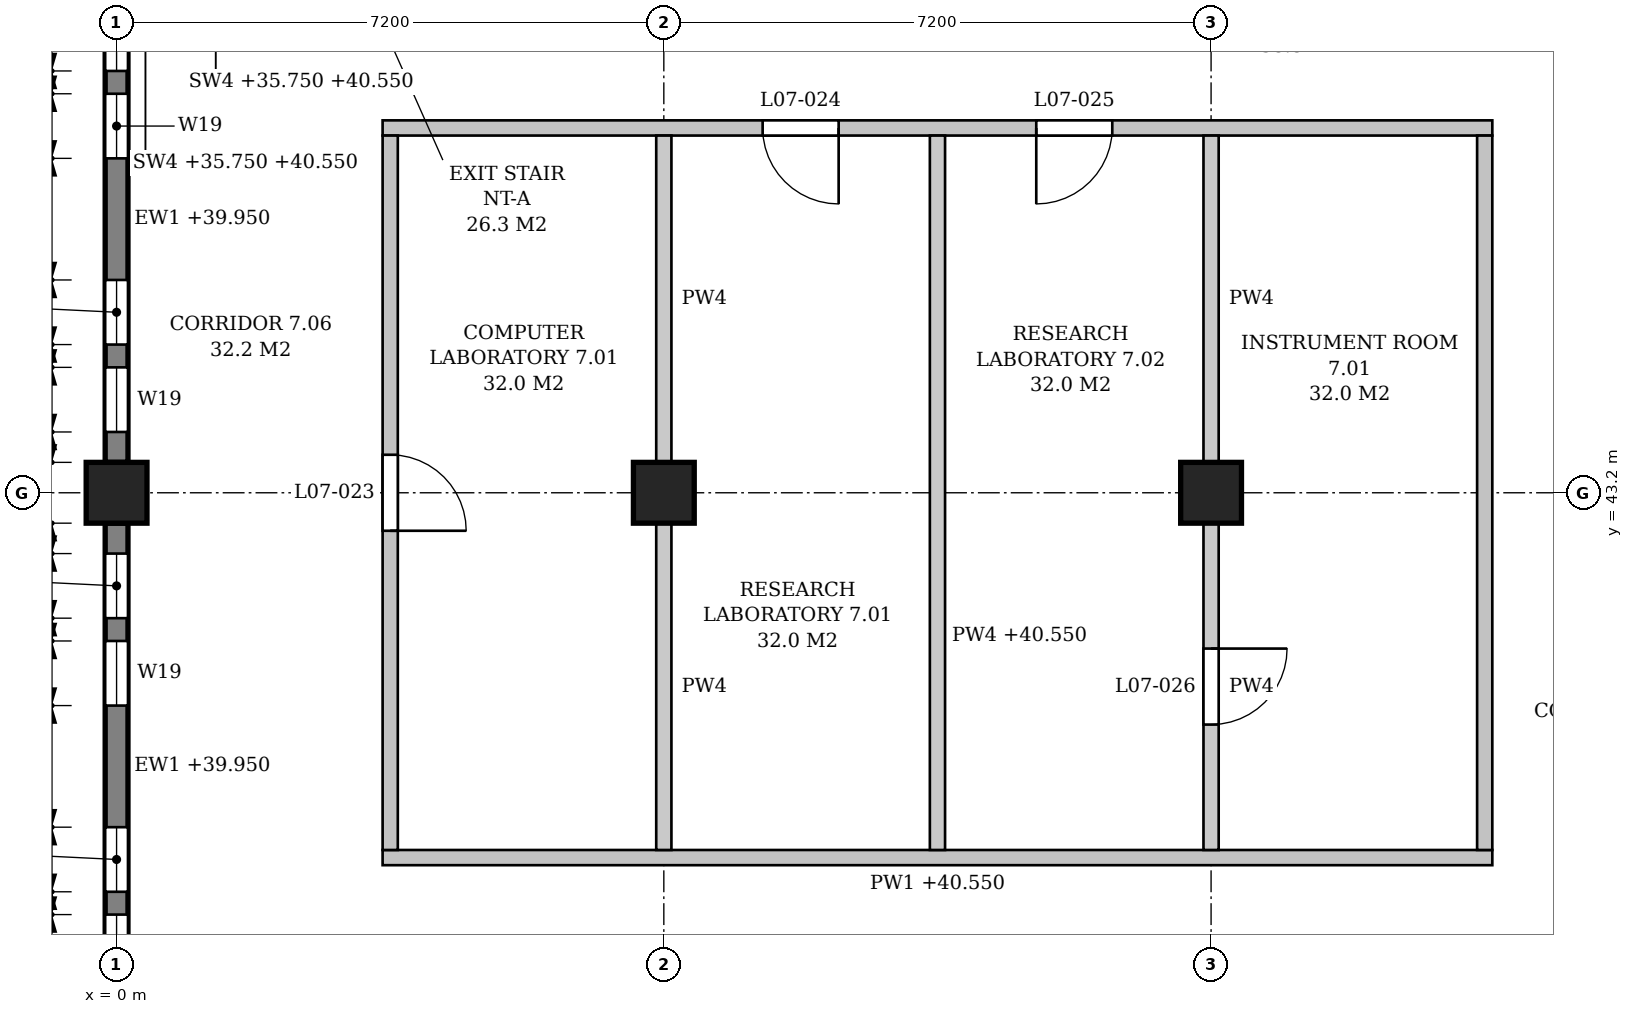
"""IFC4 building model, lengths in metres.
Left out: names, types, materials, properties, quantities, classifications, styles, units other than length and angle.
Written with IfcOpenShell. Run it as: python <this file> out.ifc"""

import sys

from ifc_helpers import new_model, si_unit, direction, frame, frame_2d, origin, origin_2d, place, context, subcontext, project, spatial, polyline, rectangle, outline, extrude, element, fill, save


model = new_model("IFC4")
c1 = context("Model", 3, precision=1e-05, world=origin(), true_north=direction((0.0, 1.0)))
c2 = subcontext(c1, "Body", "Model", "MODEL_VIEW")
j1 = project(units=[si_unit("LENGTHUNIT", "METRE"), si_unit("PLANEANGLEUNIT", "RADIAN")], contexts=[c1])
p1 = place(None, origin())
s1 = spatial("IfcSite", under=j1, at=p1, CompositionType="ELEMENT")
p2 = place(p1, origin())
s2 = spatial("IfcBuilding", under=s1, at=p2, CompositionType="ELEMENT")
p3 = place(p2, frame((0.0, 0.0, 36.0)))
s3 = spatial("IfcBuildingStorey", under=s2, at=p3, CompositionType="ELEMENT", Elevation=36.0)
for number, where, z_axis, x_axis in (
    (1, (0.0, 43.2, 0.0), (0.0, 0.0, 1.0), (1.0, 0.0, 0.0)),
    (2, (7.2, 43.2, 0.0), (0.0, 0.0, 1.0), (1.0, 0.0, 0.0)),
    (3, (14.4, 43.2, 0.0), (0.0, 0.0, 1.0), (1.0, 0.0, 0.0)),
):
    element("IfcColumn", number, at=place(p3, frame(where, z_axis=z_axis, x_axis=x_axis)), inside=s3, PredefinedType="COLUMN", context=c2, shape_type="SweptSolid", body=[
        extrude(rectangle(XDim=0.8, YDim=0.8, at=origin_2d()), origin(), (0.0, 0.0, 1.0), 4.8),
    ])
p4 = place(p3, frame((0.0, 36.4, 0.0), z_axis=(0.0, 0.0, 1.0), x_axis=(0.0, 1.0, 0.0)))
e4 = element("IfcWall", 4, at=p4, inside=s3, PredefinedType="STANDARD", context=c2, shape_type="SweptSolid", body=[
    extrude(rectangle(XDim=6.4, YDim=0.3, at=frame_2d((3.2, 0.0))), origin(), (0.0, 0.0, 1.0), 3.95),
])
p5 = place(p4, frame((0.4, 0.0, 0.9)))
e5 = element("IfcOpeningElement", 5, at=p5, cuts=e4, PredefinedType="OPENING", context=c2, shape_type="SweptSolid", body=[
    extrude(outline(polyline([(0.0, 0.0), (0.85, 0.0), (0.85, 2.55), (0.425, 3.0), (0.0, 2.55), (0.0, 0.0)])), frame((0.0, 0.16, 0.0), z_axis=(0.0, -1.0, 0.0), x_axis=(1.0, 0.0, 0.0)), (0.0, 0.0, 1.0), 0.32),
])
p6 = place(p4, frame((1.55, 0.0, 0.9)))
e6 = element("IfcOpeningElement", 6, at=p6, cuts=e4, PredefinedType="OPENING", context=c2, shape_type="SweptSolid", body=[
    extrude(outline(polyline([(0.0, 0.0), (0.85, 0.0), (0.85, 2.55), (0.425, 3.0), (0.0, 2.55), (0.0, 0.0)])), frame((0.0, 0.16, 0.0), z_axis=(0.0, -1.0, 0.0), x_axis=(1.0, 0.0, 0.0)), (0.0, 0.0, 1.0), 0.32),
])
p7 = place(p4, frame((4.0, 0.0, 0.9)))
e7 = element("IfcOpeningElement", 7, at=p7, cuts=e4, PredefinedType="OPENING", context=c2, shape_type="SweptSolid", body=[
    extrude(outline(polyline([(0.0, 0.0), (0.85, 0.0), (0.85, 2.55), (0.425, 3.0), (0.0, 2.55), (0.0, 0.0)])), frame((0.0, 0.16, 0.0), z_axis=(0.0, -1.0, 0.0), x_axis=(1.0, 0.0, 0.0)), (0.0, 0.0, 1.0), 0.32),
])
p8 = place(p4, frame((5.15, 0.0, 0.9)))
e8 = element("IfcOpeningElement", 8, at=p8, cuts=e4, PredefinedType="OPENING", context=c2, shape_type="SweptSolid", body=[
    extrude(outline(polyline([(0.0, 0.0), (0.85, 0.0), (0.85, 2.55), (0.425, 3.0), (0.0, 2.55), (0.0, 0.0)])), frame((0.0, 0.16, 0.0), z_axis=(0.0, -1.0, 0.0), x_axis=(1.0, 0.0, 0.0)), (0.0, 0.0, 1.0), 0.32),
])
p9 = place(p3, frame((0.0, 43.6, 0.0), z_axis=(0.0, 0.0, 1.0), x_axis=(0.0, 1.0, 0.0)))
e9 = element("IfcWall", 9, at=p9, inside=s3, PredefinedType="STANDARD", context=c2, shape_type="SweptSolid", body=[
    extrude(rectangle(XDim=6.4, YDim=0.3, at=frame_2d((3.2, 0.0))), origin(), (0.0, 0.0, 1.0), 3.95),
])
p10 = place(p9, frame((0.4, 0.0, 0.9)))
e10 = element("IfcOpeningElement", 10, at=p10, cuts=e9, PredefinedType="OPENING", context=c2, shape_type="SweptSolid", body=[
    extrude(outline(polyline([(0.0, 0.0), (0.85, 0.0), (0.85, 2.55), (0.425, 3.0), (0.0, 2.55), (0.0, 0.0)])), frame((0.0, 0.16, 0.0), z_axis=(0.0, -1.0, 0.0), x_axis=(1.0, 0.0, 0.0)), (0.0, 0.0, 1.0), 0.32),
])
p11 = place(p9, frame((1.55, 0.0, 0.9)))
e11 = element("IfcOpeningElement", 11, at=p11, cuts=e9, PredefinedType="OPENING", context=c2, shape_type="SweptSolid", body=[
    extrude(outline(polyline([(0.0, 0.0), (0.85, 0.0), (0.85, 2.55), (0.425, 3.0), (0.0, 2.55), (0.0, 0.0)])), frame((0.0, 0.16, 0.0), z_axis=(0.0, -1.0, 0.0), x_axis=(1.0, 0.0, 0.0)), (0.0, 0.0, 1.0), 0.32),
])
p12 = place(p9, frame((4.0, 0.0, 0.9)))
e12 = element("IfcOpeningElement", 12, at=p12, cuts=e9, PredefinedType="OPENING", context=c2, shape_type="SweptSolid", body=[
    extrude(outline(polyline([(0.0, 0.0), (0.85, 0.0), (0.85, 2.55), (0.425, 3.0), (0.0, 2.55), (0.0, 0.0)])), frame((0.0, 0.16, 0.0), z_axis=(0.0, -1.0, 0.0), x_axis=(1.0, 0.0, 0.0)), (0.0, 0.0, 1.0), 0.32),
])
p13 = place(p9, frame((5.15, 0.0, 0.9)))
e13 = element("IfcOpeningElement", 13, at=p13, cuts=e9, PredefinedType="OPENING", context=c2, shape_type="SweptSolid", body=[
    extrude(outline(polyline([(0.0, 0.0), (0.85, 0.0), (0.85, 2.55), (0.425, 3.0), (0.0, 2.55), (0.0, 0.0)])), frame((0.0, 0.16, 0.0), z_axis=(0.0, -1.0, 0.0), x_axis=(1.0, 0.0, 0.0)), (0.0, 0.0, 1.0), 0.32),
])
p14 = place(p3, frame((3.5, 38.4, 0.0), z_axis=(0.0, 0.0, 1.0), x_axis=(1.0, 0.0, 0.0)))
e14 = element("IfcWall", 14, at=p14, inside=s3, PredefinedType="PARTITIONING", context=c2, shape_type="SweptSolid", body=[
    extrude(outline(polyline([(0.0, 0.0), (14.6, 0.0), (14.6, 4.55), (11.125, 4.55), (11.125, 3.85), (10.675, 3.85), (10.675, 4.55), (3.925, 4.55), (3.925, 3.85), (3.475, 3.85), (3.475, 4.55), (0.0, 4.55), (0.0, 0.0)])), frame((0.0, 0.1, 0.0), z_axis=(0.0, -1.0, 0.0), x_axis=(1.0, 0.0, 0.0)), (0.0, 0.0, 1.0), 0.2),
])
p15 = place(p3, frame((3.5, 48.0, 0.0), z_axis=(0.0, 0.0, 1.0), x_axis=(1.0, 0.0, 0.0)))
e15 = element("IfcWall", 15, at=p15, inside=s3, PredefinedType="PARTITIONING", context=c2, shape_type="SweptSolid", body=[
    extrude(outline(polyline([(0.0, 0.0), (14.6, 0.0), (14.6, 4.55), (11.125, 4.55), (11.125, 3.85), (10.675, 3.85), (10.675, 4.55), (3.925, 4.55), (3.925, 3.85), (3.475, 3.85), (3.475, 4.55), (0.0, 4.55), (0.0, 0.0)])), frame((0.0, 0.1, 0.0), z_axis=(0.0, -1.0, 0.0), x_axis=(1.0, 0.0, 0.0)), (0.0, 0.0, 1.0), 0.2),
])
p16 = place(p15, frame((5.0, 0.0, 0.0)))
e16 = element("IfcOpeningElement", 16, at=p16, cuts=e15, PredefinedType="OPENING", context=c2, shape_type="SweptSolid", body=[
    extrude(rectangle(XDim=1.0, YDim=2.1, at=frame_2d((0.5, 1.05))), frame((0.0, 0.11, 0.0), z_axis=(0.0, -1.0, 0.0), x_axis=(1.0, 0.0, 0.0)), (0.0, 0.0, 1.0), 0.22),
])
p17 = place(p15, frame((8.6, 0.0, 0.0)))
e17 = element("IfcOpeningElement", 17, at=p17, cuts=e15, PredefinedType="OPENING", context=c2, shape_type="SweptSolid", body=[
    extrude(rectangle(XDim=1.0, YDim=2.1, at=frame_2d((0.5, 1.05))), frame((0.0, 0.11, 0.0), z_axis=(0.0, -1.0, 0.0), x_axis=(1.0, 0.0, 0.0)), (0.0, 0.0, 1.0), 0.22),
])
p18 = place(p3, frame((3.6, 38.5, 0.0), z_axis=(0.0, 0.0, 1.0), x_axis=(0.0, 1.0, 0.0)))
e18 = element("IfcWall", 18, at=p18, inside=s3, PredefinedType="PARTITIONING", context=c2, shape_type="SweptSolid", body=[
    extrude(outline(polyline([(0.0, 0.0), (9.4, 0.0), (9.4, 4.55), (4.925, 4.55), (4.925, 3.85), (4.475, 3.85), (4.475, 4.55), (0.0, 4.55), (0.0, 0.0)])), frame((0.0, 0.1, 0.0), z_axis=(0.0, -1.0, 0.0), x_axis=(1.0, 0.0, 0.0)), (0.0, 0.0, 1.0), 0.2),
])
p19 = place(p18, frame((4.2, 0.0, 0.0)))
e19 = element("IfcOpeningElement", 19, at=p19, cuts=e18, PredefinedType="OPENING", context=c2, shape_type="SweptSolid", body=[
    extrude(rectangle(XDim=1.0, YDim=2.1, at=frame_2d((0.5, 1.05))), frame((0.0, 0.11, 0.0), z_axis=(0.0, -1.0, 0.0), x_axis=(1.0, 0.0, 0.0)), (0.0, 0.0, 1.0), 0.22),
])
p20 = place(p3, frame((7.2, 38.5, 0.0), z_axis=(0.0, 0.0, 1.0), x_axis=(0.0, 1.0, 0.0)))
e20 = element("IfcWall", 20, at=p20, inside=s3, PredefinedType="PARTITIONING", context=c2, shape_type="SweptSolid", body=[
    extrude(rectangle(XDim=4.3, YDim=0.2, at=frame_2d((2.15, 0.0))), origin(), (0.0, 0.0, 1.0), 3.85),
])
p21 = place(p3, frame((7.2, 43.6, 0.0), z_axis=(0.0, 0.0, 1.0), x_axis=(0.0, 1.0, 0.0)))
e21 = element("IfcWall", 21, at=p21, inside=s3, PredefinedType="PARTITIONING", context=c2, shape_type="SweptSolid", body=[
    extrude(rectangle(XDim=4.3, YDim=0.2, at=frame_2d((2.15, 0.0))), origin(), (0.0, 0.0, 1.0), 3.85),
])
p22 = place(p3, frame((10.8, 38.5, 0.0), z_axis=(0.0, 0.0, 1.0), x_axis=(0.0, 1.0, 0.0)))
e22 = element("IfcWall", 22, at=p22, inside=s3, PredefinedType="PARTITIONING", context=c2, shape_type="SweptSolid", body=[
    extrude(outline(polyline([(0.0, 0.0), (9.4, 0.0), (9.4, 4.55), (4.925, 4.55), (4.925, 3.85), (4.475, 3.85), (4.475, 4.55), (0.0, 4.55), (0.0, 0.0)])), frame((0.0, 0.1, 0.0), z_axis=(0.0, -1.0, 0.0), x_axis=(1.0, 0.0, 0.0)), (0.0, 0.0, 1.0), 0.2),
])
p23 = place(p3, frame((14.4, 38.5, 0.0), z_axis=(0.0, 0.0, 1.0), x_axis=(0.0, 1.0, 0.0)))
e23 = element("IfcWall", 23, at=p23, inside=s3, PredefinedType="PARTITIONING", context=c2, shape_type="SweptSolid", body=[
    extrude(rectangle(XDim=4.3, YDim=0.2, at=frame_2d((2.15, 0.0))), origin(), (0.0, 0.0, 1.0), 3.85),
])
p24 = place(p23, frame((1.65, 0.0, 0.0)))
e24 = element("IfcOpeningElement", 24, at=p24, cuts=e23, PredefinedType="OPENING", context=c2, shape_type="SweptSolid", body=[
    extrude(rectangle(XDim=1.0, YDim=2.1, at=frame_2d((0.5, 1.05))), frame((0.0, 0.11, 0.0), z_axis=(0.0, -1.0, 0.0), x_axis=(1.0, 0.0, 0.0)), (0.0, 0.0, 1.0), 0.22),
])
p25 = place(p3, frame((14.4, 43.6, 0.0), z_axis=(0.0, 0.0, 1.0), x_axis=(0.0, 1.0, 0.0)))
e25 = element("IfcWall", 25, at=p25, inside=s3, PredefinedType="PARTITIONING", context=c2, shape_type="SweptSolid", body=[
    extrude(rectangle(XDim=4.3, YDim=0.2, at=frame_2d((2.15, 0.0))), origin(), (0.0, 0.0, 1.0), 3.85),
])
p26 = place(p3, frame((18.0, 38.5, 0.0), z_axis=(0.0, 0.0, 1.0), x_axis=(0.0, 1.0, 0.0)))
e26 = element("IfcWall", 26, at=p26, inside=s3, PredefinedType="PARTITIONING", context=c2, shape_type="SweptSolid", body=[
    extrude(outline(polyline([(0.0, 0.0), (9.4, 0.0), (9.4, 4.55), (4.925, 4.55), (4.925, 3.85), (4.475, 3.85), (4.475, 4.55), (0.0, 4.55), (0.0, 0.0)])), frame((0.0, 0.1, 0.0), z_axis=(0.0, -1.0, 0.0), x_axis=(1.0, 0.0, 0.0)), (0.0, 0.0, 1.0), 0.2),
])
p27 = place(p5, origin())
e27 = element("IfcWindow", 27, at=p27, inside=s3, PartitioningType="SINGLE_PANEL", PredefinedType="WINDOW", context=c2, shape_type="SweptSolid", body=[
    extrude(outline(polyline([(0.0, 0.0), (0.85, 0.0), (0.85, 2.55), (0.425, 3.0), (0.0, 2.55), (0.0, 0.0)])), frame((0.0, 0.03, 0.0), z_axis=(0.0, -1.0, 0.0), x_axis=(1.0, 0.0, 0.0)), (0.0, 0.0, 1.0), 0.06),
])
fill(e5, e27)
p28 = place(p6, origin())
e28 = element("IfcWindow", 28, at=p28, inside=s3, PartitioningType="SINGLE_PANEL", PredefinedType="WINDOW", context=c2, shape_type="SweptSolid", body=[
    extrude(outline(polyline([(0.0, 0.0), (0.85, 0.0), (0.85, 2.55), (0.425, 3.0), (0.0, 2.55), (0.0, 0.0)])), frame((0.0, 0.03, 0.0), z_axis=(0.0, -1.0, 0.0), x_axis=(1.0, 0.0, 0.0)), (0.0, 0.0, 1.0), 0.06),
])
fill(e6, e28)
p29 = place(p7, origin())
e29 = element("IfcWindow", 29, at=p29, inside=s3, PartitioningType="SINGLE_PANEL", PredefinedType="WINDOW", context=c2, shape_type="SweptSolid", body=[
    extrude(outline(polyline([(0.0, 0.0), (0.85, 0.0), (0.85, 2.55), (0.425, 3.0), (0.0, 2.55), (0.0, 0.0)])), frame((0.0, 0.03, 0.0), z_axis=(0.0, -1.0, 0.0), x_axis=(1.0, 0.0, 0.0)), (0.0, 0.0, 1.0), 0.06),
])
fill(e7, e29)
p30 = place(p8, origin())
e30 = element("IfcWindow", 30, at=p30, inside=s3, PartitioningType="SINGLE_PANEL", PredefinedType="WINDOW", context=c2, shape_type="SweptSolid", body=[
    extrude(outline(polyline([(0.0, 0.0), (0.85, 0.0), (0.85, 2.55), (0.425, 3.0), (0.0, 2.55), (0.0, 0.0)])), frame((0.0, 0.03, 0.0), z_axis=(0.0, -1.0, 0.0), x_axis=(1.0, 0.0, 0.0)), (0.0, 0.0, 1.0), 0.06),
])
fill(e8, e30)
p31 = place(p10, origin())
e31 = element("IfcWindow", 31, at=p31, inside=s3, PartitioningType="SINGLE_PANEL", PredefinedType="WINDOW", context=c2, shape_type="SweptSolid", body=[
    extrude(outline(polyline([(0.0, 0.0), (0.85, 0.0), (0.85, 2.55), (0.425, 3.0), (0.0, 2.55), (0.0, 0.0)])), frame((0.0, 0.03, 0.0), z_axis=(0.0, -1.0, 0.0), x_axis=(1.0, 0.0, 0.0)), (0.0, 0.0, 1.0), 0.06),
])
fill(e10, e31)
p32 = place(p11, origin())
e32 = element("IfcWindow", 32, at=p32, inside=s3, PartitioningType="SINGLE_PANEL", PredefinedType="WINDOW", context=c2, shape_type="SweptSolid", body=[
    extrude(outline(polyline([(0.0, 0.0), (0.85, 0.0), (0.85, 2.55), (0.425, 3.0), (0.0, 2.55), (0.0, 0.0)])), frame((0.0, 0.03, 0.0), z_axis=(0.0, -1.0, 0.0), x_axis=(1.0, 0.0, 0.0)), (0.0, 0.0, 1.0), 0.06),
])
fill(e11, e32)
p33 = place(p12, origin())
e33 = element("IfcWindow", 33, at=p33, inside=s3, PartitioningType="SINGLE_PANEL", PredefinedType="WINDOW", context=c2, shape_type="SweptSolid", body=[
    extrude(outline(polyline([(0.0, 0.0), (0.85, 0.0), (0.85, 2.55), (0.425, 3.0), (0.0, 2.55), (0.0, 0.0)])), frame((0.0, 0.03, 0.0), z_axis=(0.0, -1.0, 0.0), x_axis=(1.0, 0.0, 0.0)), (0.0, 0.0, 1.0), 0.06),
])
fill(e12, e33)
p34 = place(p13, origin())
e34 = element("IfcWindow", 34, at=p34, inside=s3, PartitioningType="SINGLE_PANEL", PredefinedType="WINDOW", context=c2, shape_type="SweptSolid", body=[
    extrude(outline(polyline([(0.0, 0.0), (0.85, 0.0), (0.85, 2.55), (0.425, 3.0), (0.0, 2.55), (0.0, 0.0)])), frame((0.0, 0.03, 0.0), z_axis=(0.0, -1.0, 0.0), x_axis=(1.0, 0.0, 0.0)), (0.0, 0.0, 1.0), 0.06),
])
fill(e13, e34)
p35 = place(p19, frame((1.0, 0.0, 0.0), z_axis=(0.0, 0.0, 1.0), x_axis=(-1.0, 0.0, 0.0)))
e35 = element("IfcDoor", 35, at=p35, inside=s3, OperationType="SINGLE_SWING_RIGHT", PredefinedType="DOOR", context=c2, shape_type="SweptSolid", body=[
    extrude(rectangle(XDim=1.0, YDim=2.1, at=frame_2d((0.5, 1.05))), frame((0.0, 0.025, 0.0), z_axis=(0.0, -1.0, 0.0), x_axis=(1.0, 0.0, 0.0)), (0.0, 0.0, 1.0), 0.05),
])
fill(e19, e35)
p36 = place(p16, frame((1.0, 0.0, 0.0), z_axis=(0.0, 0.0, 1.0), x_axis=(-1.0, 0.0, 0.0)))
e36 = element("IfcDoor", 36, at=p36, inside=s3, OperationType="SINGLE_SWING_LEFT", PredefinedType="DOOR", context=c2, shape_type="SweptSolid", body=[
    extrude(rectangle(XDim=1.0, YDim=2.1, at=frame_2d((0.5, 1.05))), frame((0.0, 0.025, 0.0), z_axis=(0.0, -1.0, 0.0), x_axis=(1.0, 0.0, 0.0)), (0.0, 0.0, 1.0), 0.05),
])
fill(e16, e36)
p37 = place(p17, frame((1.0, 0.0, 0.0), z_axis=(0.0, 0.0, 1.0), x_axis=(-1.0, 0.0, 0.0)))
e37 = element("IfcDoor", 37, at=p37, inside=s3, OperationType="SINGLE_SWING_RIGHT", PredefinedType="DOOR", context=c2, shape_type="SweptSolid", body=[
    extrude(rectangle(XDim=1.0, YDim=2.1, at=frame_2d((0.5, 1.05))), frame((0.0, 0.025, 0.0), z_axis=(0.0, -1.0, 0.0), x_axis=(1.0, 0.0, 0.0)), (0.0, 0.0, 1.0), 0.05),
])
fill(e17, e37)
p38 = place(p24, frame((1.0, 0.0, 0.0), z_axis=(0.0, 0.0, 1.0), x_axis=(-1.0, 0.0, 0.0)))
e38 = element("IfcDoor", 38, at=p38, inside=s3, OperationType="SINGLE_SWING_LEFT", PredefinedType="DOOR", context=c2, shape_type="SweptSolid", body=[
    extrude(rectangle(XDim=1.0, YDim=2.1, at=frame_2d((0.5, 1.05))), frame((0.0, 0.025, 0.0), z_axis=(0.0, -1.0, 0.0), x_axis=(1.0, 0.0, 0.0)), (0.0, 0.0, 1.0), 0.05),
])
fill(e24, e38)
save(model, sys.argv[1])
